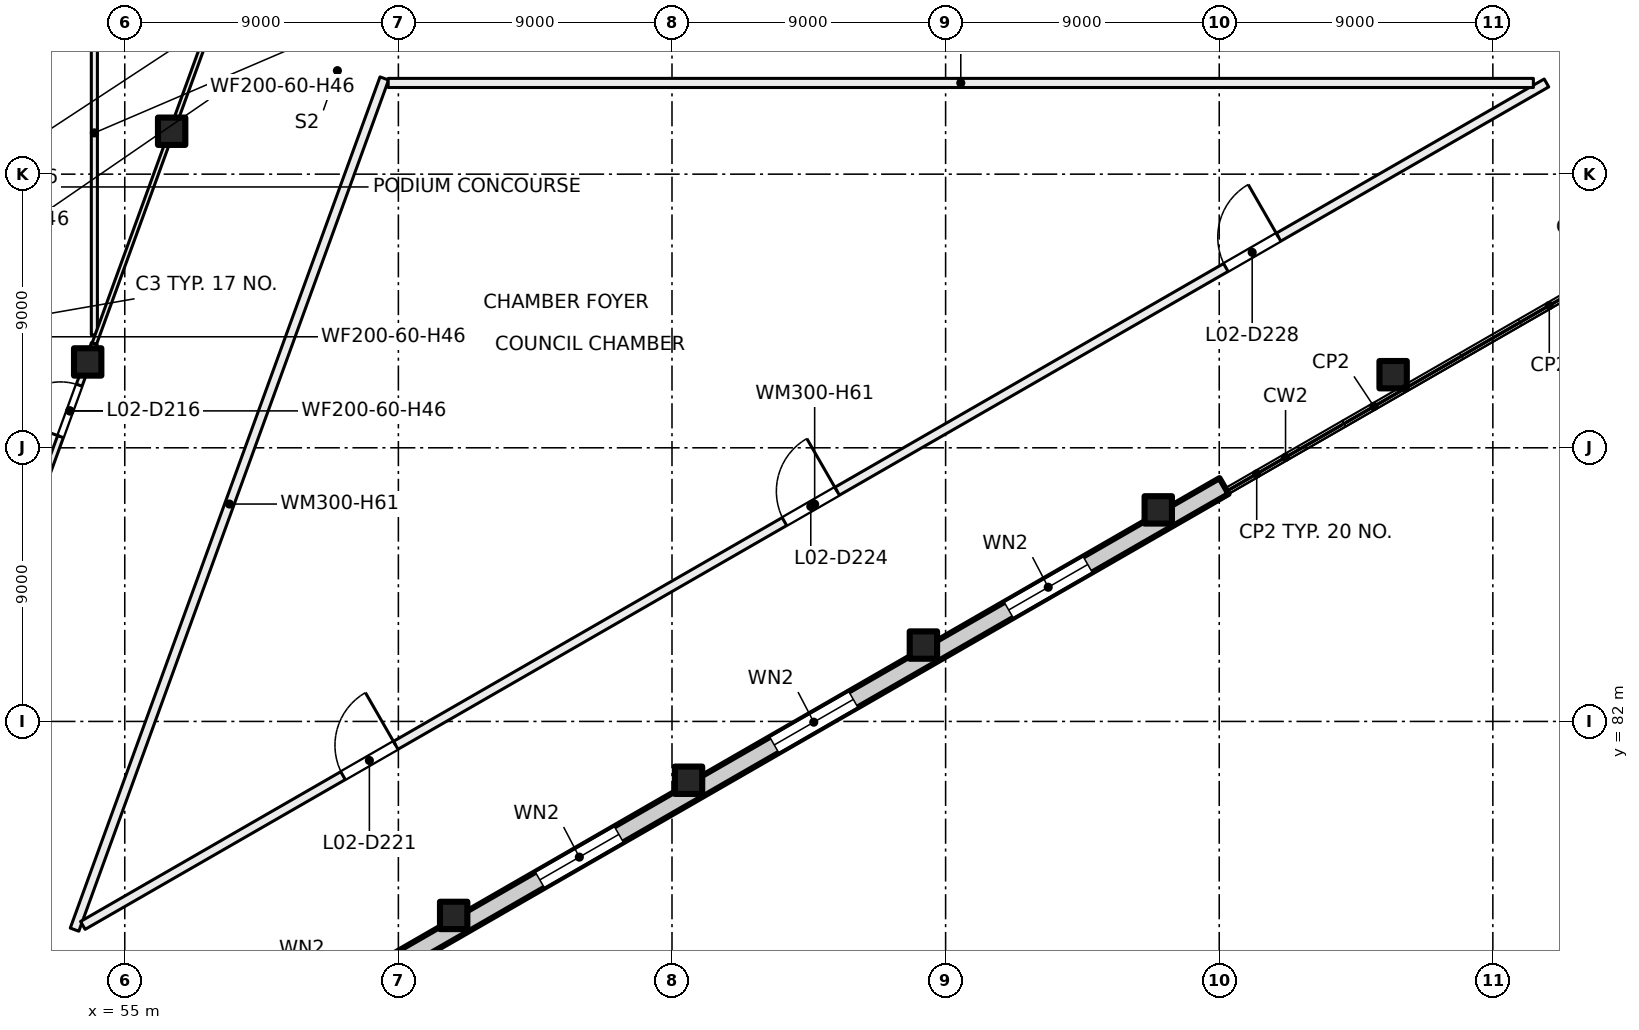
"""IFC4 building model, lengths in metres.
Left out: names, types, materials, properties, quantities, classifications, styles, units other than length and angle.
Written with IfcOpenShell. Run it as: python <this file> out.ifc"""

import sys

from ifc_helpers import new_model, si_unit, direction, frame, frame_2d, origin, origin_2d, place, context, subcontext, project, spatial, rectangle, extrude, element, fill, save


model = new_model("IFC4")
c1 = context("Model", 3, precision=1e-05, world=origin(), true_north=direction((0.0, 1.0)))
c2 = subcontext(c1, "Body", "Model", "MODEL_VIEW")
j1 = project(units=[si_unit("LENGTHUNIT", "METRE"), si_unit("PLANEANGLEUNIT", "RADIAN")], contexts=[c1])
p1 = place(None, origin())
s1 = spatial("IfcSite", under=j1, at=p1, CompositionType="ELEMENT")
p2 = place(p1, origin())
s2 = spatial("IfcBuilding", under=s1, at=p2, CompositionType="ELEMENT")
p3 = place(p2, frame((0.0, 0.0, 12.5)))
s3 = spatial("IfcBuildingStorey", under=s2, at=p3, CompositionType="ELEMENT", Elevation=12.5)
for number, where, z_axis, x_axis in (
    (1, (96.72, 93.405, 0.0), (0.0, 0.0, 1.0), (1.0, 0.0, 0.0)),
    (2, (88.994, 88.958, 0.0), (0.0, 0.0, 1.0), (1.0, 0.0, 0.0)),
    (3, (81.269, 84.512, 0.0), (0.0, 0.0, 1.0), (1.0, 0.0, 0.0)),
    (4, (73.544, 80.066, 0.0), (0.0, 0.0, 1.0), (1.0, 0.0, 0.0)),
    (5, (65.818, 75.619, 0.0), (0.0, 0.0, 1.0), (1.0, 0.0, 0.0)),
    (6, (53.78, 93.824, 0.0), (0.0, 0.0, 1.0), (1.0, 0.0, 0.0)),
    (7, (56.542, 101.412, 0.0), (0.0, 0.0, 1.0), (1.0, 0.0, 0.0)),
):
    element("IfcColumn", number, at=place(p3, frame(where, z_axis=z_axis, x_axis=x_axis)), inside=s3, PredefinedType="COLUMN", context=c2, shape_type="SweptSolid", body=[
        extrude(rectangle(XDim=0.9, YDim=0.9, at=origin_2d()), origin(), (0.0, 0.0, 1.0), 5.0),
    ])
p4 = place(p3, frame((91.159, 89.742, 0.0), z_axis=(0.0, 0.0, 1.0), x_axis=(-0.866704063601, -0.498822680055, 0.0)))
e8 = element("IfcWall", 8, at=p4, inside=s3, PredefinedType="SOLIDWALL", context=c2, shape_type="SweptSolid", body=[
    extrude(rectangle(XDim=44.487, YDim=0.6, at=frame_2d((22.244, 0.0))), origin(), (0.0, 0.0, 1.0), 4.6),
])
p5 = place(p4, frame((5.173, 0.0, 0.9)))
e9 = element("IfcOpeningElement", 9, at=p5, cuts=e8, PredefinedType="OPENING", context=c2, shape_type="SweptSolid", body=[
    extrude(rectangle(XDim=3.0, YDim=3.0, at=frame_2d((1.5, 1.5))), frame((0.0, 0.31, 0.0), z_axis=(0.0, -1.0, 0.0), x_axis=(1.0, 0.0, 0.0)), (0.0, 0.0, 1.0), 0.62),
])
p6 = place(p4, frame((14.071, 0.0, 0.9)))
e10 = element("IfcOpeningElement", 10, at=p6, cuts=e8, PredefinedType="OPENING", context=c2, shape_type="SweptSolid", body=[
    extrude(rectangle(XDim=3.0, YDim=3.0, at=frame_2d((1.5, 1.5))), frame((0.0, 0.31, 0.0), z_axis=(0.0, -1.0, 0.0), x_axis=(1.0, 0.0, 0.0)), (0.0, 0.0, 1.0), 0.62),
])
p7 = place(p4, frame((22.968, 0.0, 0.9)))
e11 = element("IfcOpeningElement", 11, at=p7, cuts=e8, PredefinedType="OPENING", context=c2, shape_type="SweptSolid", body=[
    extrude(rectangle(XDim=3.0, YDim=3.0, at=frame_2d((1.5, 1.5))), frame((0.0, 0.31, 0.0), z_axis=(0.0, -1.0, 0.0), x_axis=(1.0, 0.0, 0.0)), (0.0, 0.0, 1.0), 0.62),
])
p8 = place(p4, frame((31.865, 0.0, 0.9)))
e12 = element("IfcOpeningElement", 12, at=p8, cuts=e8, PredefinedType="OPENING", context=c2, shape_type="SweptSolid", body=[
    extrude(rectangle(XDim=3.0, YDim=3.0, at=frame_2d((1.5, 1.5))), frame((0.0, 0.31, 0.0), z_axis=(0.0, -1.0, 0.0), x_axis=(1.0, 0.0, 0.0)), (0.0, 0.0, 1.0), 0.62),
])
p9 = place(p4, frame((40.613, 0.0, 0.9)))
e13 = element("IfcOpeningElement", 13, at=p9, cuts=e8, PredefinedType="OPENING", context=c2, shape_type="SweptSolid", body=[
    extrude(rectangle(XDim=3.0, YDim=3.0, at=frame_2d((1.5, 1.5))), frame((0.0, 0.31, 0.0), z_axis=(0.0, -1.0, 0.0), x_axis=(1.0, 0.0, 0.0)), (0.0, 0.0, 1.0), 0.62),
])
p10 = place(p3, frame((52.388, 90.0, 0.0), z_axis=(0.0, 0.0, 1.0), x_axis=(0.342096627731, 0.939664779214, 0.0)))
e14 = element("IfcWall", 14, at=p10, inside=s3, PredefinedType="PARTITIONING", context=c2, shape_type="SweptSolid", body=[
    extrude(rectangle(XDim=4.712, YDim=0.2, at=frame_2d((2.356, 0.0))), origin(), (0.0, 0.0, 1.0), 4.6),
])
p11 = place(p10, frame((1.456, 0.0, 0.0)))
e15 = element("IfcOpeningElement", 15, at=p11, cuts=e14, PredefinedType="OPENING", context=c2, shape_type="SweptSolid", body=[
    extrude(rectangle(XDim=1.8, YDim=2.1, at=frame_2d((0.9, 1.05))), frame((0.0, 0.11, 0.0), z_axis=(0.0, -1.0, 0.0), x_axis=(1.0, 0.0, 0.0)), (0.0, 0.0, 1.0), 0.22),
])
p12 = place(p3, frame((53.348, 75.152, 0.0), z_axis=(0.0, 0.0, 1.0), x_axis=(0.342006895874, 0.939697442358, 0.0)))
e16 = element("IfcWall", 16, at=p12, inside=s3, PredefinedType="PARTITIONING", context=c2, shape_type="SweptSolid", body=[
    extrude(rectangle(XDim=29.792, YDim=0.3, at=frame_2d((14.896, 0.0))), origin(), (0.0, 0.0, 1.0), 6.1),
])
p13 = place(p3, frame((101.764, 103.0, 0.0), z_axis=(0.0, 0.0, 1.0), x_axis=(-0.866697259032, -0.498834502802, 0.0)))
e17 = element("IfcWall", 17, at=p13, inside=s3, PredefinedType="PARTITIONING", context=c2, shape_type="SweptSolid", body=[
    extrude(rectangle(XDim=55.547, YDim=0.3, at=frame_2d((27.774, 0.0))), origin(), (0.0, 0.0, 1.0), 6.1),
])
p14 = place(p13, frame((43.673, 0.0, 0.0)))
e18 = element("IfcOpeningElement", 18, at=p14, cuts=e17, PredefinedType="OPENING", context=c2, shape_type="SweptSolid", body=[
    extrude(rectangle(XDim=2.0, YDim=2.1, at=frame_2d((1.0, 1.05))), frame((0.0, 0.16, 0.0), z_axis=(0.0, -1.0, 0.0), x_axis=(1.0, 0.0, 0.0)), (0.0, 0.0, 1.0), 0.32),
])
p15 = place(p13, frame((26.921, 0.0, 0.0)))
e19 = element("IfcOpeningElement", 19, at=p15, cuts=e17, PredefinedType="OPENING", context=c2, shape_type="SweptSolid", body=[
    extrude(rectangle(XDim=2.0, YDim=2.1, at=frame_2d((1.0, 1.05))), frame((0.0, 0.16, 0.0), z_axis=(0.0, -1.0, 0.0), x_axis=(1.0, 0.0, 0.0)), (0.0, 0.0, 1.0), 0.32),
])
p16 = place(p13, frame((10.169, 0.0, 0.0)))
e20 = element("IfcOpeningElement", 20, at=p16, cuts=e17, PredefinedType="OPENING", context=c2, shape_type="SweptSolid", body=[
    extrude(rectangle(XDim=2.0, YDim=2.1, at=frame_2d((1.0, 1.05))), frame((0.0, 0.16, 0.0), z_axis=(0.0, -1.0, 0.0), x_axis=(1.0, 0.0, 0.0)), (0.0, 0.0, 1.0), 0.32),
])
p17 = place(p3, frame((54.0, 94.715, 0.0), z_axis=(0.0, 0.0, 1.0), x_axis=(0.0, 1.0, 0.0)))
e21 = element("IfcWall", 21, at=p17, inside=s3, PredefinedType="PARTITIONING", context=c2, shape_type="SweptSolid", body=[
    extrude(rectangle(XDim=13.285, YDim=0.2, at=frame_2d((6.643, 0.0))), origin(), (0.0, 0.0, 1.0), 4.6),
])
p18 = place(p3, frame((54.0, 94.429, 0.0), z_axis=(0.0, 0.0, 1.0), x_axis=(0.342085241875, 0.939668924298, 0.0)))
e22 = element("IfcWall", 22, at=p18, inside=s3, PredefinedType="PARTITIONING", context=c2, shape_type="SweptSolid", body=[
    extrude(rectangle(XDim=15.581, YDim=0.15, at=frame_2d((7.791, 0.0))), origin(), (0.0, 0.0, 1.0), 4.6),
])
p19 = place(p3, frame((63.665, 103.0, 0.0), z_axis=(0.0, 0.0, 1.0), x_axis=(1.0, 0.0, 0.0)))
e23 = element("IfcWall", 23, at=p19, inside=s3, PredefinedType="PARTITIONING", context=c2, shape_type="SweptSolid", body=[
    extrude(rectangle(XDim=37.668, YDim=0.3, at=frame_2d((18.834, 0.0))), origin(), (0.0, 0.0, 1.0), 6.1),
])
p20 = place(p5, origin())
e24 = element("IfcWindow", 24, at=p20, inside=s3, PartitioningType="SINGLE_PANEL", PredefinedType="WINDOW", context=c2, shape_type="SweptSolid", body=[
    extrude(rectangle(XDim=3.0, YDim=3.0, at=frame_2d((1.5, 1.5))), frame((0.0, 0.03, 0.0), z_axis=(0.0, -1.0, 0.0), x_axis=(1.0, 0.0, 0.0)), (0.0, 0.0, 1.0), 0.06),
])
fill(e9, e24)
p21 = place(p6, origin())
e25 = element("IfcWindow", 25, at=p21, inside=s3, PartitioningType="SINGLE_PANEL", PredefinedType="WINDOW", context=c2, shape_type="SweptSolid", body=[
    extrude(rectangle(XDim=3.0, YDim=3.0, at=frame_2d((1.5, 1.5))), frame((0.0, 0.03, 0.0), z_axis=(0.0, -1.0, 0.0), x_axis=(1.0, 0.0, 0.0)), (0.0, 0.0, 1.0), 0.06),
])
fill(e10, e25)
p22 = place(p7, origin())
e26 = element("IfcWindow", 26, at=p22, inside=s3, PartitioningType="SINGLE_PANEL", PredefinedType="WINDOW", context=c2, shape_type="SweptSolid", body=[
    extrude(rectangle(XDim=3.0, YDim=3.0, at=frame_2d((1.5, 1.5))), frame((0.0, 0.03, 0.0), z_axis=(0.0, -1.0, 0.0), x_axis=(1.0, 0.0, 0.0)), (0.0, 0.0, 1.0), 0.06),
])
fill(e11, e26)
p23 = place(p11, origin())
e27 = element("IfcDoor", 27, at=p23, inside=s3, OperationType="DOUBLE_DOOR_SINGLE_SWING", PredefinedType="DOOR", context=c2, shape_type="SweptSolid", body=[
    extrude(rectangle(XDim=1.8, YDim=2.1, at=frame_2d((0.9, 1.05))), frame((0.0, 0.025, 0.0), z_axis=(0.0, -1.0, 0.0), x_axis=(1.0, 0.0, 0.0)), (0.0, 0.0, 1.0), 0.05),
])
fill(e15, e27)
p24 = place(p14, origin())
e28 = element("IfcDoor", 28, at=p24, inside=s3, OperationType="DOUBLE_DOOR_SINGLE_SWING", PredefinedType="DOOR", context=c2, shape_type="SweptSolid", body=[
    extrude(rectangle(XDim=2.0, YDim=2.1, at=frame_2d((1.0, 1.05))), frame((0.0, 0.025, 0.0), z_axis=(0.0, -1.0, 0.0), x_axis=(1.0, 0.0, 0.0)), (0.0, 0.0, 1.0), 0.05),
])
fill(e18, e28)
p25 = place(p15, origin())
e29 = element("IfcDoor", 29, at=p25, inside=s3, OperationType="DOUBLE_DOOR_SINGLE_SWING", PredefinedType="DOOR", context=c2, shape_type="SweptSolid", body=[
    extrude(rectangle(XDim=2.0, YDim=2.1, at=frame_2d((1.0, 1.05))), frame((0.0, 0.025, 0.0), z_axis=(0.0, -1.0, 0.0), x_axis=(1.0, 0.0, 0.0)), (0.0, 0.0, 1.0), 0.05),
])
fill(e19, e29)
p26 = place(p16, origin())
e30 = element("IfcDoor", 30, at=p26, inside=s3, OperationType="DOUBLE_DOOR_SINGLE_SWING", PredefinedType="DOOR", context=c2, shape_type="SweptSolid", body=[
    extrude(rectangle(XDim=2.0, YDim=2.1, at=frame_2d((1.0, 1.05))), frame((0.0, 0.025, 0.0), z_axis=(0.0, -1.0, 0.0), x_axis=(1.0, 0.0, 0.0)), (0.0, 0.0, 1.0), 0.05),
])
fill(e20, e30)
save(model, sys.argv[1])
